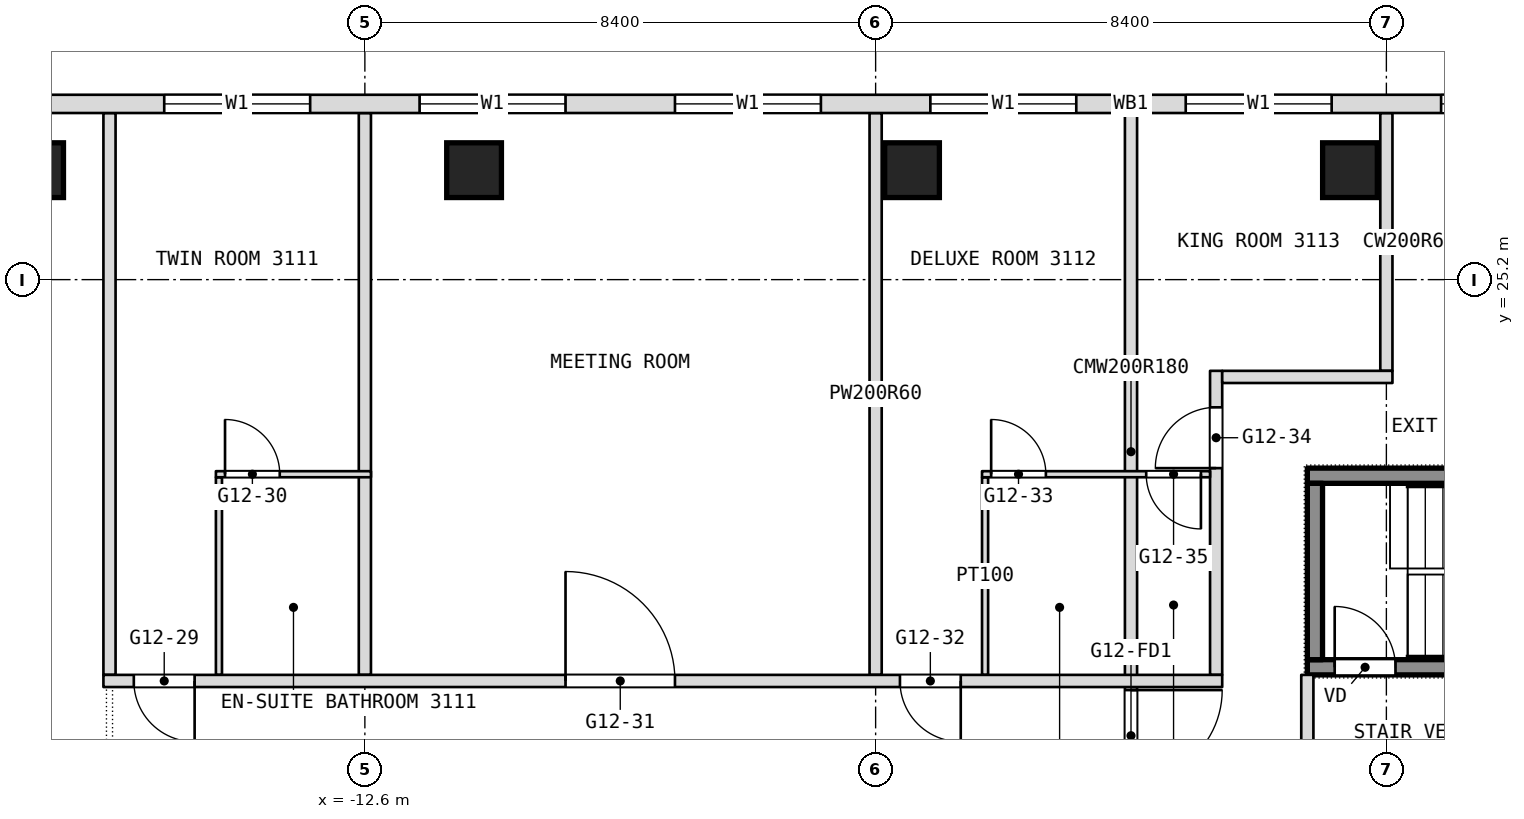
"""IFC4 building model, lengths in metres.
Left out: names, types, materials, properties, quantities, classifications, styles, units other than length and angle.
Written with IfcOpenShell. Run it as: python <this file> out.ifc"""

import sys

from ifc_helpers import new_model, si_unit, direction, frame, frame_2d, origin, origin_2d, place, context, subcontext, project, spatial, rectangle, extrude, element, fill, save


model = new_model("IFC4")
c1 = context("Model", 3, precision=1e-05, world=origin(), true_north=direction((0.0, 1.0)))
c2 = subcontext(c1, "Body", "Model", "MODEL_VIEW")
j1 = project(units=[si_unit("LENGTHUNIT", "METRE"), si_unit("PLANEANGLEUNIT", "RADIAN")], contexts=[c1])
p1 = place(None, origin())
s1 = spatial("IfcSite", under=j1, at=p1, CompositionType="ELEMENT")
p2 = place(p1, origin())
s2 = spatial("IfcBuilding", under=s1, at=p2, CompositionType="ELEMENT")
p3 = place(p2, frame((0.0, 0.0, 137.3)))
s3 = spatial("IfcBuildingStorey", under=s2, at=p3, CompositionType="ELEMENT", Elevation=137.3)
for number, where, z_axis, x_axis in (
    (1, (-18.007, 27.0, 0.0), (0.0, 0.0, 1.0), (1.0, 0.0, 0.0)),
    (2, (-10.804, 27.0, 0.0), (0.0, 0.0, 1.0), (1.0, 0.0, 0.0)),
    (3, (-3.601, 27.0, 0.0), (0.0, 0.0, 1.0), (1.0, 0.0, 0.0)),
    (4, (3.601, 27.0, 0.0), (0.0, 0.0, 1.0), (1.0, 0.0, 0.0)),
):
    element("IfcColumn", number, at=place(p3, frame(where, z_axis=z_axis, x_axis=x_axis)), inside=s3, PredefinedType="COLUMN", context=c2, shape_type="SweptSolid", body=[
        extrude(rectangle(XDim=0.9, YDim=0.9, at=origin_2d()), origin(), (0.0, 0.0, 1.0), 3.6),
    ])
p4 = place(p3, frame((4.2, 23.7, 0.0), z_axis=(0.0, 0.0, 1.0), x_axis=(0.0, 1.0, 0.0)))
e5 = element("IfcWall", 5, at=p4, inside=s3, PredefinedType="PARTITIONING", context=c2, shape_type="SweptSolid", body=[
    extrude(rectangle(XDim=4.24, YDim=0.2, at=frame_2d((2.12, 0.0))), origin(), (0.0, 0.0, 1.0), 3.34),
])
p5 = place(p3, frame((2.9, 16.9, 0.0), z_axis=(0.0, 0.0, 1.0), x_axis=(0.0, 1.0, 0.0)))
e6 = element("IfcWall", 6, at=p5, inside=s3, PredefinedType="PARTITIONING", context=c2, shape_type="SweptSolid", body=[
    extrude(rectangle(XDim=1.8, YDim=0.2, at=frame_2d((0.9, 0.0))), origin(), (0.0, 0.0, 1.0), 3.34),
])
p6 = place(p3, frame((1.4, 18.7, 0.0), z_axis=(0.0, 0.0, 1.0), x_axis=(0.0, 1.0, 0.0)))
e7 = element("IfcWall", 7, at=p6, inside=s3, PredefinedType="PARTITIONING", context=c2, shape_type="SweptSolid", body=[
    extrude(rectangle(XDim=5.0, YDim=0.2, at=frame_2d((2.5, 0.0))), origin(), (0.0, 0.0, 1.0), 3.34),
])
p7 = place(p6, frame((3.4, 0.0, 0.0)))
e8 = element("IfcOpeningElement", 8, at=p7, cuts=e7, PredefinedType="OPENING", context=c2, shape_type="SweptSolid", body=[
    extrude(rectangle(XDim=1.0, YDim=2.1, at=frame_2d((0.5, 1.05))), frame((0.0, 0.1, 0.0), z_axis=(0.0, -1.0, 0.0), x_axis=(1.0, 0.0, 0.0)), (0.0, 0.0, 1.0), 0.2),
])
p8 = place(p3, frame((0.0, 16.8, 0.0), z_axis=(0.0, 0.0, 1.0), x_axis=(0.0, 1.0, 0.0)))
e9 = element("IfcWall", 9, at=p8, inside=s3, PredefinedType="PARTITIONING", context=c2, shape_type="SweptSolid", body=[
    extrude(rectangle(XDim=11.14, YDim=0.2, at=frame_2d((5.57, 0.0))), origin(), (0.0, 0.0, 1.0), 3.34),
])
p9 = place(p8, frame((0.15, 0.0, 0.0)))
e10 = element("IfcOpeningElement", 10, at=p9, cuts=e9, PredefinedType="OPENING", context=c2, shape_type="SweptSolid", body=[
    extrude(rectangle(XDim=1.5, YDim=2.1, at=frame_2d((0.75, 1.05))), frame((0.0, 0.1, 0.0), z_axis=(0.0, -1.0, 0.0), x_axis=(1.0, 0.0, 0.0)), (0.0, 0.0, 1.0), 0.2),
])
p10 = place(p3, frame((-2.4, 18.7, 0.0), z_axis=(0.0, 0.0, 1.0), x_axis=(0.0, 1.0, 0.0)))
e11 = element("IfcWall", 11, at=p10, inside=s3, PredefinedType="PARTITIONING", context=c2, shape_type="SweptSolid", body=[
    extrude(rectangle(XDim=3.25, YDim=0.1, at=frame_2d((1.625, 0.0))), origin(), (0.0, 0.0, 1.0), 3.34),
])
for number, where, z_axis, x_axis in (
    (12, (-4.2, 18.7, 0.0), (0.0, 0.0, 1.0), (0.0, 1.0, 0.0)),
    (13, (-12.6, 18.7, 0.0), (0.0, 0.0, 1.0), (0.0, 1.0, 0.0)),
):
    element("IfcWall", number, at=place(p3, frame(where, z_axis=z_axis, x_axis=x_axis)), inside=s3, PredefinedType="PARTITIONING", context=c2, shape_type="SweptSolid", body=[
        extrude(rectangle(XDim=9.24, YDim=0.2, at=frame_2d((4.62, 0.0))), origin(), (0.0, 0.0, 1.0), 3.34),
    ])
p11 = place(p3, frame((-15.0, 18.7, 0.0), z_axis=(0.0, 0.0, 1.0), x_axis=(0.0, 1.0, 0.0)))
e14 = element("IfcWall", 14, at=p11, inside=s3, PredefinedType="PARTITIONING", context=c2, shape_type="SweptSolid", body=[
    extrude(rectangle(XDim=3.25, YDim=0.1, at=frame_2d((1.625, 0.0))), origin(), (0.0, 0.0, 1.0), 3.34),
])
p12 = place(p3, frame((-16.8, 18.7, 0.0), z_axis=(0.0, 0.0, 1.0), x_axis=(0.0, 1.0, 0.0)))
e15 = element("IfcWall", 15, at=p12, inside=s3, PredefinedType="PARTITIONING", context=c2, shape_type="SweptSolid", body=[
    extrude(rectangle(XDim=9.24, YDim=0.2, at=frame_2d((4.62, 0.0))), origin(), (0.0, 0.0, 1.0), 3.34),
])
p13 = place(p3, frame((-16.9, 18.6, 0.0), z_axis=(0.0, 0.0, 1.0), x_axis=(1.0, 0.0, 0.0)))
e16 = element("IfcWall", 16, at=p13, inside=s3, PredefinedType="PARTITIONING", context=c2, shape_type="SweptSolid", body=[
    extrude(rectangle(XDim=18.4, YDim=0.2, at=frame_2d((9.2, 0.0))), origin(), (0.0, 0.0, 1.0), 3.34),
])
p14 = place(p13, frame((0.5, 0.0, 0.0)))
e17 = element("IfcOpeningElement", 17, at=p14, cuts=e16, PredefinedType="OPENING", context=c2, shape_type="SweptSolid", body=[
    extrude(rectangle(XDim=1.0, YDim=2.1, at=frame_2d((0.5, 1.05))), frame((0.0, 0.1, 0.0), z_axis=(0.0, -1.0, 0.0), x_axis=(1.0, 0.0, 0.0)), (0.0, 0.0, 1.0), 0.2),
])
p15 = place(p13, frame((7.6, 0.0, 0.0)))
e18 = element("IfcOpeningElement", 18, at=p15, cuts=e16, PredefinedType="OPENING", context=c2, shape_type="SweptSolid", body=[
    extrude(rectangle(XDim=1.8, YDim=2.1, at=frame_2d((0.9, 1.05))), frame((0.0, 0.1, 0.0), z_axis=(0.0, -1.0, 0.0), x_axis=(1.0, 0.0, 0.0)), (0.0, 0.0, 1.0), 0.2),
])
p16 = place(p13, frame((13.1, 0.0, 0.0)))
e19 = element("IfcOpeningElement", 19, at=p16, cuts=e16, PredefinedType="OPENING", context=c2, shape_type="SweptSolid", body=[
    extrude(rectangle(XDim=1.0, YDim=2.1, at=frame_2d((0.5, 1.05))), frame((0.0, 0.1, 0.0), z_axis=(0.0, -1.0, 0.0), x_axis=(1.0, 0.0, 0.0)), (0.0, 0.0, 1.0), 0.2),
])
p17 = place(p3, frame((-15.05, 22.0, 0.0), z_axis=(0.0, 0.0, 1.0), x_axis=(1.0, 0.0, 0.0)))
e20 = element("IfcWall", 20, at=p17, inside=s3, PredefinedType="PARTITIONING", context=c2, shape_type="SweptSolid", body=[
    extrude(rectangle(XDim=2.55, YDim=0.1, at=frame_2d((1.275, 0.0))), origin(), (0.0, 0.0, 1.0), 3.34),
])
p18 = place(p17, frame((0.15, 0.0, 0.0)))
e21 = element("IfcOpeningElement", 21, at=p18, cuts=e20, PredefinedType="OPENING", context=c2, shape_type="SweptSolid", body=[
    extrude(rectangle(XDim=0.9, YDim=2.1, at=frame_2d((0.45, 1.05))), frame((0.0, 0.05, 0.0), z_axis=(0.0, -1.0, 0.0), x_axis=(1.0, 0.0, 0.0)), (0.0, 0.0, 1.0), 0.1),
])
p19 = place(p3, frame((-2.45, 22.0, 0.0), z_axis=(0.0, 0.0, 1.0), x_axis=(1.0, 0.0, 0.0)))
e22 = element("IfcWall", 22, at=p19, inside=s3, PredefinedType="PARTITIONING", context=c2, shape_type="SweptSolid", body=[
    extrude(rectangle(XDim=3.75, YDim=0.1, at=frame_2d((1.875, 0.0))), origin(), (0.0, 0.0, 1.0), 3.34),
])
p20 = place(p19, frame((0.15, 0.0, 0.0)))
e23 = element("IfcOpeningElement", 23, at=p20, cuts=e22, PredefinedType="OPENING", context=c2, shape_type="SweptSolid", body=[
    extrude(rectangle(XDim=0.9, YDim=2.1, at=frame_2d((0.45, 1.05))), frame((0.0, 0.05, 0.0), z_axis=(0.0, -1.0, 0.0), x_axis=(1.0, 0.0, 0.0)), (0.0, 0.0, 1.0), 0.1),
])
p21 = place(p19, frame((2.7, 0.0, 0.0)))
e24 = element("IfcOpeningElement", 24, at=p21, cuts=e22, PredefinedType="OPENING", context=c2, shape_type="SweptSolid", body=[
    extrude(rectangle(XDim=0.9, YDim=2.1, at=frame_2d((0.45, 1.05))), frame((0.0, 0.05, 0.0), z_axis=(0.0, -1.0, 0.0), x_axis=(1.0, 0.0, 0.0)), (0.0, 0.0, 1.0), 0.1),
])
p22 = place(p3, frame((1.5, 23.6, 0.0), z_axis=(0.0, 0.0, 1.0), x_axis=(1.0, 0.0, 0.0)))
e25 = element("IfcWall", 25, at=p22, inside=s3, PredefinedType="PARTITIONING", context=c2, shape_type="SweptSolid", body=[
    extrude(rectangle(XDim=2.8, YDim=0.2, at=frame_2d((1.4, 0.0))), origin(), (0.0, 0.0, 1.0), 3.34),
])
p23 = place(p3, frame((21.306, 28.09, 0.0), z_axis=(0.0, 0.0, 1.0), x_axis=(-1.0, 0.0, 0.0)))
e26 = element("IfcWall", 26, at=p23, inside=s3, PredefinedType="NOTDEFINED", context=c2, shape_type="SweptSolid", body=[
    extrude(rectangle(XDim=42.612, YDim=0.3, at=frame_2d((21.306, 0.0))), origin(), (0.0, 0.0, 1.0), 3.6),
])
p24 = place(p23, frame((5.406, 0.0, 0.9)))
e27 = element("IfcOpeningElement", 27, at=p24, cuts=e26, PredefinedType="OPENING", context=c2, shape_type="SweptSolid", body=[
    extrude(rectangle(XDim=2.4, YDim=2.1, at=frame_2d((1.2, 1.05))), frame((0.0, 0.15, 0.0), z_axis=(0.0, -1.0, 0.0), x_axis=(1.0, 0.0, 0.0)), (0.0, 0.0, 1.0), 0.3),
])
p25 = place(p23, frame((9.606, 0.0, 0.9)))
e28 = element("IfcOpeningElement", 28, at=p25, cuts=e26, PredefinedType="OPENING", context=c2, shape_type="SweptSolid", body=[
    extrude(rectangle(XDim=2.4, YDim=2.1, at=frame_2d((1.2, 1.05))), frame((0.0, 0.15, 0.0), z_axis=(0.0, -1.0, 0.0), x_axis=(1.0, 0.0, 0.0)), (0.0, 0.0, 1.0), 0.3),
])
p26 = place(p23, frame((13.806, 0.0, 0.9)))
e29 = element("IfcOpeningElement", 29, at=p26, cuts=e26, PredefinedType="OPENING", context=c2, shape_type="SweptSolid", body=[
    extrude(rectangle(XDim=2.4, YDim=2.1, at=frame_2d((1.2, 1.05))), frame((0.0, 0.15, 0.0), z_axis=(0.0, -1.0, 0.0), x_axis=(1.0, 0.0, 0.0)), (0.0, 0.0, 1.0), 0.3),
])
p27 = place(p23, frame((18.006, 0.0, 0.9)))
e30 = element("IfcOpeningElement", 30, at=p27, cuts=e26, PredefinedType="OPENING", context=c2, shape_type="SweptSolid", body=[
    extrude(rectangle(XDim=2.4, YDim=2.1, at=frame_2d((1.2, 1.05))), frame((0.0, 0.15, 0.0), z_axis=(0.0, -1.0, 0.0), x_axis=(1.0, 0.0, 0.0)), (0.0, 0.0, 1.0), 0.3),
])
p28 = place(p23, frame((22.206, 0.0, 0.9)))
e31 = element("IfcOpeningElement", 31, at=p28, cuts=e26, PredefinedType="OPENING", context=c2, shape_type="SweptSolid", body=[
    extrude(rectangle(XDim=2.4, YDim=2.1, at=frame_2d((1.2, 1.05))), frame((0.0, 0.15, 0.0), z_axis=(0.0, -1.0, 0.0), x_axis=(1.0, 0.0, 0.0)), (0.0, 0.0, 1.0), 0.3),
])
p29 = place(p23, frame((26.406, 0.0, 0.9)))
e32 = element("IfcOpeningElement", 32, at=p29, cuts=e26, PredefinedType="OPENING", context=c2, shape_type="SweptSolid", body=[
    extrude(rectangle(XDim=2.4, YDim=2.1, at=frame_2d((1.2, 1.05))), frame((0.0, 0.15, 0.0), z_axis=(0.0, -1.0, 0.0), x_axis=(1.0, 0.0, 0.0)), (0.0, 0.0, 1.0), 0.3),
])
p30 = place(p23, frame((30.606, 0.0, 0.9)))
e33 = element("IfcOpeningElement", 33, at=p30, cuts=e26, PredefinedType="OPENING", context=c2, shape_type="SweptSolid", body=[
    extrude(rectangle(XDim=2.4, YDim=2.1, at=frame_2d((1.2, 1.05))), frame((0.0, 0.15, 0.0), z_axis=(0.0, -1.0, 0.0), x_axis=(1.0, 0.0, 0.0)), (0.0, 0.0, 1.0), 0.3),
])
p31 = place(p23, frame((34.806, 0.0, 0.9)))
e34 = element("IfcOpeningElement", 34, at=p31, cuts=e26, PredefinedType="OPENING", context=c2, shape_type="SweptSolid", body=[
    extrude(rectangle(XDim=2.4, YDim=2.1, at=frame_2d((1.2, 1.05))), frame((0.0, 0.15, 0.0), z_axis=(0.0, -1.0, 0.0), x_axis=(1.0, 0.0, 0.0)), (0.0, 0.0, 1.0), 0.3),
])
p32 = place(p3, frame((2.9, 18.825, 0.1), z_axis=(0.0, 0.0, 1.0), x_axis=(1.0, 0.0, 0.0)))
e35 = element("IfcWall", 35, at=p32, inside=s3, PredefinedType="SHEAR", context=c2, shape_type="SweptSolid", body=[
    extrude(rectangle(XDim=6.2, YDim=0.25, at=frame_2d((3.1, 0.0))), origin(), (0.0, 0.0, 1.0), 3.6),
])
p33 = place(p32, frame((0.45, 0.0, 0.0)))
e36 = element("IfcOpeningElement", 36, at=p33, cuts=e35, PredefinedType="OPENING", context=c2, shape_type="SweptSolid", body=[
    extrude(rectangle(XDim=1.0, YDim=2.1, at=frame_2d((0.5, 1.05))), frame((0.0, 0.125, 0.0), z_axis=(0.0, -1.0, 0.0), x_axis=(1.0, 0.0, 0.0)), (0.0, 0.0, 1.0), 0.25),
])
p34 = place(p3, frame((2.9, 21.975, 0.1), z_axis=(0.0, 0.0, 1.0), x_axis=(1.0, 0.0, 0.0)))
e37 = element("IfcWall", 37, at=p34, inside=s3, PredefinedType="SHEAR", context=c2, shape_type="SweptSolid", body=[
    extrude(rectangle(XDim=6.2, YDim=0.25, at=frame_2d((3.1, 0.0))), origin(), (0.0, 0.0, 1.0), 3.6),
])
p35 = place(p3, frame((3.025, 18.95, 0.1), z_axis=(0.0, 0.0, 1.0), x_axis=(0.0, 1.0, 0.0)))
e38 = element("IfcWall", 38, at=p35, inside=s3, PredefinedType="SHEAR", context=c2, shape_type="SweptSolid", body=[
    extrude(rectangle(XDim=2.9, YDim=0.25, at=frame_2d((1.45, 0.0))), origin(), (0.0, 0.0, 1.0), 3.6),
])
p36 = place(p7, origin())
e39 = element("IfcDoor", 39, at=p36, inside=s3, OperationType="SINGLE_SWING_RIGHT", PredefinedType="DOOR", context=c2, shape_type="SweptSolid", body=[
    extrude(rectangle(XDim=1.0, YDim=2.1, at=frame_2d((0.5, 1.05))), frame((0.0, 0.025, 0.0), z_axis=(0.0, -1.0, 0.0), x_axis=(1.0, 0.0, 0.0)), (0.0, 0.0, 1.0), 0.05),
])
fill(e8, e39)
p37 = place(p14, origin())
e40 = element("IfcDoor", 40, at=p37, inside=s3, OperationType="SINGLE_SWING_RIGHT", PredefinedType="DOOR", context=c2, shape_type="SweptSolid", body=[
    extrude(rectangle(XDim=1.0, YDim=2.1, at=frame_2d((0.5, 1.05))), frame((0.0, 0.025, 0.0), z_axis=(0.0, -1.0, 0.0), x_axis=(1.0, 0.0, 0.0)), (0.0, 0.0, 1.0), 0.05),
])
fill(e17, e40)
p38 = place(p15, origin())
e41 = element("IfcDoor", 41, at=p38, inside=s3, OperationType="DOUBLE_DOOR_SINGLE_SWING", PredefinedType="DOOR", context=c2, shape_type="SweptSolid", body=[
    extrude(rectangle(XDim=1.8, YDim=2.1, at=frame_2d((0.9, 1.05))), frame((0.0, 0.025, 0.0), z_axis=(0.0, -1.0, 0.0), x_axis=(1.0, 0.0, 0.0)), (0.0, 0.0, 1.0), 0.05),
])
fill(e18, e41)
p39 = place(p16, origin())
e42 = element("IfcDoor", 42, at=p39, inside=s3, OperationType="SINGLE_SWING_LEFT", PredefinedType="DOOR", context=c2, shape_type="SweptSolid", body=[
    extrude(rectangle(XDim=1.0, YDim=2.1, at=frame_2d((0.5, 1.05))), frame((0.0, 0.025, 0.0), z_axis=(0.0, -1.0, 0.0), x_axis=(1.0, 0.0, 0.0)), (0.0, 0.0, 1.0), 0.05),
])
fill(e19, e42)
p40 = place(p18, origin())
e43 = element("IfcDoor", 43, at=p40, inside=s3, OperationType="SINGLE_SWING_RIGHT", PredefinedType="DOOR", context=c2, shape_type="SweptSolid", body=[
    extrude(rectangle(XDim=0.9, YDim=2.1, at=frame_2d((0.45, 1.05))), frame((0.0, 0.025, 0.0), z_axis=(0.0, -1.0, 0.0), x_axis=(1.0, 0.0, 0.0)), (0.0, 0.0, 1.0), 0.05),
])
fill(e21, e43)
p41 = place(p20, origin())
e44 = element("IfcDoor", 44, at=p41, inside=s3, OperationType="SINGLE_SWING_RIGHT", PredefinedType="DOOR", context=c2, shape_type="SweptSolid", body=[
    extrude(rectangle(XDim=0.9, YDim=2.1, at=frame_2d((0.45, 1.05))), frame((0.0, 0.025, 0.0), z_axis=(0.0, -1.0, 0.0), x_axis=(1.0, 0.0, 0.0)), (0.0, 0.0, 1.0), 0.05),
])
fill(e23, e44)
p42 = place(p21, origin())
e45 = element("IfcDoor", 45, at=p42, inside=s3, OperationType="SINGLE_SWING_LEFT", PredefinedType="DOOR", context=c2, shape_type="SweptSolid", body=[
    extrude(rectangle(XDim=0.9, YDim=2.1, at=frame_2d((0.45, 1.05))), frame((0.0, 0.025, 0.0), z_axis=(0.0, -1.0, 0.0), x_axis=(1.0, 0.0, 0.0)), (0.0, 0.0, 1.0), 0.05),
])
fill(e24, e45)
p43 = place(p26, origin())
e46 = element("IfcWindow", 46, at=p43, inside=s3, PartitioningType="SINGLE_PANEL", PredefinedType="WINDOW", context=c2, shape_type="SweptSolid", body=[
    extrude(rectangle(XDim=2.4, YDim=2.1, at=frame_2d((1.2, 1.05))), frame((0.0, 0.03, 0.0), z_axis=(0.0, -1.0, 0.0), x_axis=(1.0, 0.0, 0.0)), (0.0, 0.0, 1.0), 0.06),
])
fill(e29, e46)
p44 = place(p27, origin())
e47 = element("IfcWindow", 47, at=p44, inside=s3, PartitioningType="SINGLE_PANEL", PredefinedType="WINDOW", context=c2, shape_type="SweptSolid", body=[
    extrude(rectangle(XDim=2.4, YDim=2.1, at=frame_2d((1.2, 1.05))), frame((0.0, 0.03, 0.0), z_axis=(0.0, -1.0, 0.0), x_axis=(1.0, 0.0, 0.0)), (0.0, 0.0, 1.0), 0.06),
])
fill(e30, e47)
p45 = place(p28, origin())
e48 = element("IfcWindow", 48, at=p45, inside=s3, PartitioningType="SINGLE_PANEL", PredefinedType="WINDOW", context=c2, shape_type="SweptSolid", body=[
    extrude(rectangle(XDim=2.4, YDim=2.1, at=frame_2d((1.2, 1.05))), frame((0.0, 0.03, 0.0), z_axis=(0.0, -1.0, 0.0), x_axis=(1.0, 0.0, 0.0)), (0.0, 0.0, 1.0), 0.06),
])
fill(e31, e48)
p46 = place(p29, origin())
e49 = element("IfcWindow", 49, at=p46, inside=s3, PartitioningType="SINGLE_PANEL", PredefinedType="WINDOW", context=c2, shape_type="SweptSolid", body=[
    extrude(rectangle(XDim=2.4, YDim=2.1, at=frame_2d((1.2, 1.05))), frame((0.0, 0.03, 0.0), z_axis=(0.0, -1.0, 0.0), x_axis=(1.0, 0.0, 0.0)), (0.0, 0.0, 1.0), 0.06),
])
fill(e32, e49)
p47 = place(p30, origin())
e50 = element("IfcWindow", 50, at=p47, inside=s3, PartitioningType="SINGLE_PANEL", PredefinedType="WINDOW", context=c2, shape_type="SweptSolid", body=[
    extrude(rectangle(XDim=2.4, YDim=2.1, at=frame_2d((1.2, 1.05))), frame((0.0, 0.03, 0.0), z_axis=(0.0, -1.0, 0.0), x_axis=(1.0, 0.0, 0.0)), (0.0, 0.0, 1.0), 0.06),
])
fill(e33, e50)
p48 = place(p31, origin())
e51 = element("IfcWindow", 51, at=p48, inside=s3, PartitioningType="SINGLE_PANEL", PredefinedType="WINDOW", context=c2, shape_type="SweptSolid", body=[
    extrude(rectangle(XDim=2.4, YDim=2.1, at=frame_2d((1.2, 1.05))), frame((0.0, 0.03, 0.0), z_axis=(0.0, -1.0, 0.0), x_axis=(1.0, 0.0, 0.0)), (0.0, 0.0, 1.0), 0.06),
])
fill(e34, e51)
p49 = place(p33, origin())
e52 = element("IfcDoor", 52, at=p49, inside=s3, OperationType="SINGLE_SWING_LEFT", PredefinedType="DOOR", context=c2, shape_type="SweptSolid", body=[
    extrude(rectangle(XDim=1.0, YDim=2.1, at=frame_2d((0.5, 1.05))), frame((0.0, 0.025, 0.0), z_axis=(0.0, -1.0, 0.0), x_axis=(1.0, 0.0, 0.0)), (0.0, 0.0, 1.0), 0.05),
])
fill(e36, e52)
p50 = place(p9, origin())
e53 = element("IfcDoor", 53, at=p50, inside=s3, OperationType="DOUBLE_DOOR_DOUBLE_SWING", PredefinedType="DOOR", context=c2, shape_type="SweptSolid", body=[
    extrude(rectangle(XDim=1.5, YDim=2.1, at=frame_2d((0.75, 1.05))), frame((0.0, 0.025, 0.0), z_axis=(0.0, -1.0, 0.0), x_axis=(1.0, 0.0, 0.0)), (0.0, 0.0, 1.0), 0.05),
])
fill(e10, e53)
save(model, sys.argv[1])
